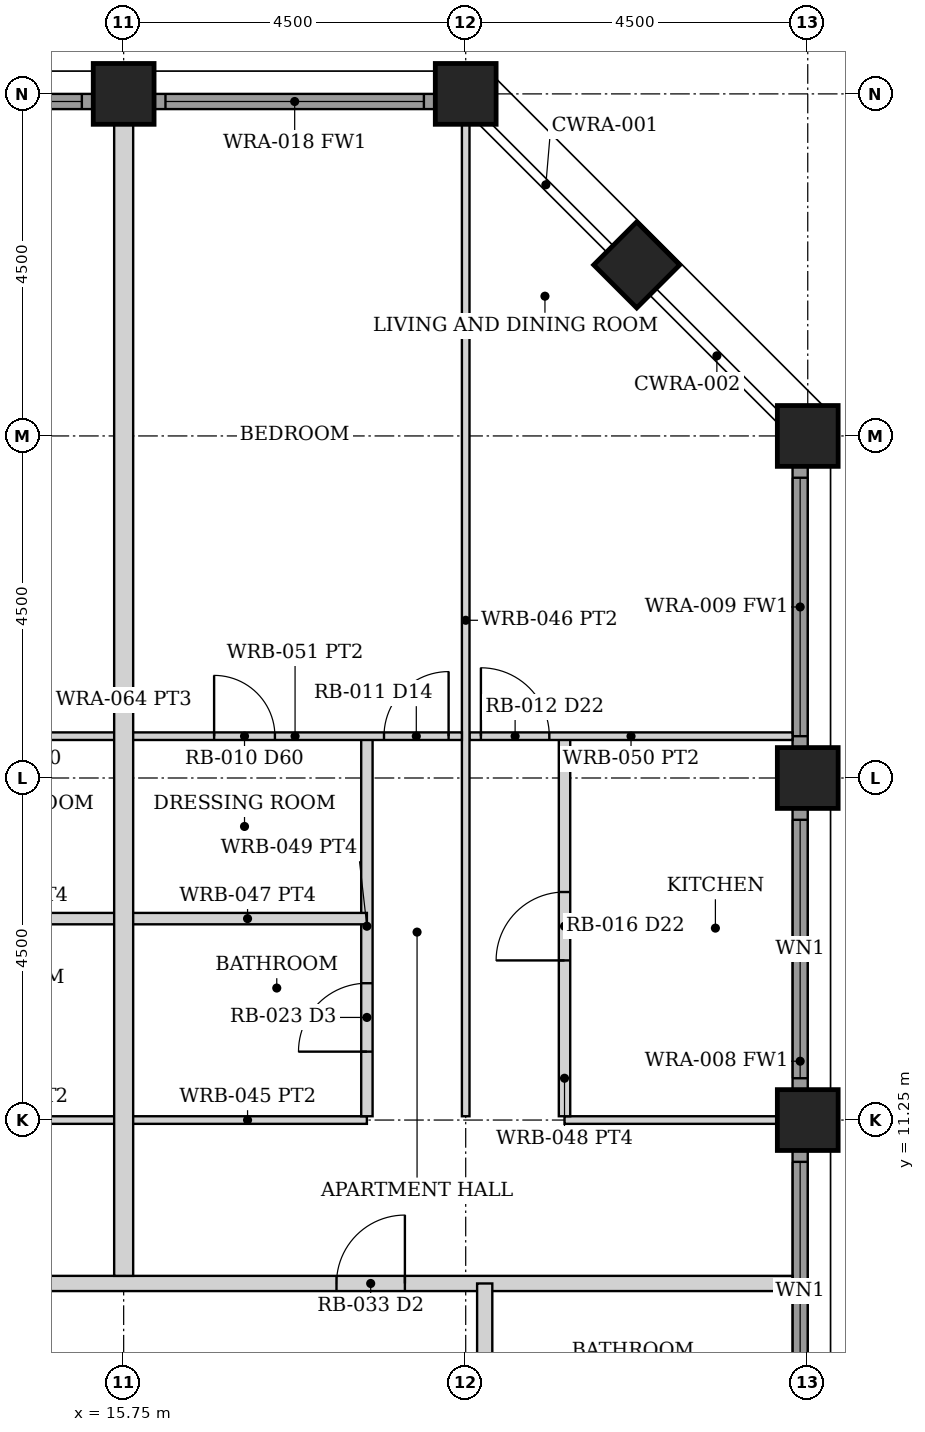
"""IFC4 building model, lengths in metres.
Left out: names, types, materials, properties, quantities, classifications, styles, units other than length and angle.
Written with IfcOpenShell. Run it as: python <this file> out.ifc"""

import sys

from ifc_helpers import new_model, si_unit, direction, frame, frame_2d, origin, origin_2d, place, context, subcontext, project, spatial, rectangle, hollow_rectangle, extrude, element, fill, save


model = new_model("IFC4")
c1 = context("Model", 3, precision=1e-05, world=origin(), true_north=direction((0.0, 1.0)))
c2 = subcontext(c1, "Body", "Model", "MODEL_VIEW")
j1 = project(units=[si_unit("LENGTHUNIT", "METRE"), si_unit("PLANEANGLEUNIT", "RADIAN")], contexts=[c1])
p1 = place(None, origin())
s1 = spatial("IfcSite", under=j1, at=p1, CompositionType="ELEMENT")
p2 = place(p1, origin())
s2 = spatial("IfcBuilding", under=s1, at=p2, CompositionType="ELEMENT")
p3 = place(p2, frame((0.0, 0.0, 37.0)))
s3 = spatial("IfcBuildingStorey", under=s2, at=p3, CompositionType="ELEMENT", Elevation=37.0)
for number, where, z_axis, x_axis in (
    (1, (24.75, 11.25, 0.0), (0.0, 0.0, 1.0), (1.0, 0.0, 0.0)),
    (2, (15.75, 24.75, 0.0), (0.0, 0.0, 1.0), (0.0, 1.0, 0.0)),
    (3, (24.75, 15.75, 0.0), (0.0, 0.0, 1.0), (1.0, 0.0, 0.0)),
    (4, (20.25, 24.75, 0.0), (0.0, 0.0, 1.0), (0.0, 1.0, 0.0)),
    (5, (24.75, 20.25, 0.0), (0.0, 0.0, 1.0), (1.0, 0.0, 0.0)),
    (6, (22.5, 22.5, 0.0), (0.0, 0.0, 1.0), (0.707, 0.707, 0.0)),
):
    element("IfcColumn", number, at=place(p3, frame(where, z_axis=z_axis, x_axis=x_axis)), inside=s3, PredefinedType="COLUMN", context=c2, shape_type="SweptSolid", body=[
        extrude(hollow_rectangle(XDim=0.8, YDim=0.8, WallThickness=0.07, at=origin_2d()), origin(), (0.0, 0.0, 1.0), 3.5),
    ])
p4 = place(p3, frame((24.65, 7.155, 0.0), z_axis=(0.0, 0.0, 1.0), x_axis=(0.0, 1.0, 0.0)))
e7 = element("IfcWall", 7, at=p4, inside=s3, PredefinedType="SOLIDWALL", context=c2, shape_type="SweptSolid", body=[
    extrude(rectangle(XDim=3.69, YDim=0.2, at=frame_2d((1.845, 0.0))), origin(), (0.0, 0.0, 1.0), 2.379),
])
p5 = place(p4, frame((0.145, 0.0, 0.3)))
e8 = element("IfcOpeningElement", 8, at=p5, cuts=e7, PredefinedType="OPENING", context=c2, shape_type="SweptSolid", body=[
    extrude(rectangle(XDim=3.4, YDim=1.929, at=frame_2d((1.7, 0.964))), frame((0.0, 0.11, 0.0), z_axis=(0.0, -1.0, 0.0), x_axis=(1.0, 0.0, 0.0)), (0.0, 0.0, 1.0), 0.22),
])
p6 = place(p3, frame((24.65, 11.655, 0.0), z_axis=(0.0, 0.0, 1.0), x_axis=(0.0, 1.0, 0.0)))
e9 = element("IfcWall", 9, at=p6, inside=s3, PredefinedType="SOLIDWALL", context=c2, shape_type="SweptSolid", body=[
    extrude(rectangle(XDim=3.69, YDim=0.2, at=frame_2d((1.845, 0.0))), origin(), (0.0, 0.0, 1.0), 2.379),
])
p7 = place(p6, frame((0.145, 0.0, 0.3)))
e10 = element("IfcOpeningElement", 10, at=p7, cuts=e9, PredefinedType="OPENING", context=c2, shape_type="SweptSolid", body=[
    extrude(rectangle(XDim=3.4, YDim=1.929, at=frame_2d((1.7, 0.964))), frame((0.0, 0.11, 0.0), z_axis=(0.0, -1.0, 0.0), x_axis=(1.0, 0.0, 0.0)), (0.0, 0.0, 1.0), 0.22),
])
p8 = place(p3, frame((24.65, 16.155, 0.0), z_axis=(0.0, 0.0, 1.0), x_axis=(0.0, 1.0, 0.0)))
e11 = element("IfcWall", 11, at=p8, inside=s3, PredefinedType="SOLIDWALL", context=c2, shape_type="SweptSolid", body=[
    extrude(rectangle(XDim=3.69, YDim=0.2, at=frame_2d((1.845, 0.0))), origin(), (0.0, 0.0, 1.0), 2.379),
])
p9 = place(p8, frame((0.145, 0.0, 0.3)))
e12 = element("IfcOpeningElement", 12, at=p9, cuts=e11, PredefinedType="OPENING", context=c2, shape_type="SweptSolid", body=[
    extrude(rectangle(XDim=3.4, YDim=1.929, at=frame_2d((1.7, 0.964))), frame((0.0, 0.11, 0.0), z_axis=(0.0, -1.0, 0.0), x_axis=(1.0, 0.0, 0.0)), (0.0, 0.0, 1.0), 0.22),
])
p10 = place(p3, frame((11.655, 24.65, 0.0), z_axis=(0.0, 0.0, 1.0), x_axis=(1.0, 0.0, 0.0)))
e13 = element("IfcWall", 13, at=p10, inside=s3, PredefinedType="SOLIDWALL", context=c2, shape_type="SweptSolid", body=[
    extrude(rectangle(XDim=3.69, YDim=0.2, at=frame_2d((1.845, 0.0))), origin(), (0.0, 0.0, 1.0), 2.379),
])
p11 = place(p10, frame((0.145, 0.0, 0.3)))
e14 = element("IfcOpeningElement", 14, at=p11, cuts=e13, PredefinedType="OPENING", context=c2, shape_type="SweptSolid", body=[
    extrude(rectangle(XDim=3.4, YDim=1.929, at=frame_2d((1.7, 0.964))), frame((0.0, 0.11, 0.0), z_axis=(0.0, -1.0, 0.0), x_axis=(1.0, 0.0, 0.0)), (0.0, 0.0, 1.0), 0.22),
])
p12 = place(p3, frame((16.155, 24.65, 0.0), z_axis=(0.0, 0.0, 1.0), x_axis=(1.0, 0.0, 0.0)))
e15 = element("IfcWall", 15, at=p12, inside=s3, PredefinedType="SOLIDWALL", context=c2, shape_type="SweptSolid", body=[
    extrude(rectangle(XDim=3.69, YDim=0.2, at=frame_2d((1.845, 0.0))), origin(), (0.0, 0.0, 1.0), 2.379),
])
p13 = place(p12, frame((0.145, 0.0, 0.3)))
e16 = element("IfcOpeningElement", 16, at=p13, cuts=e15, PredefinedType="OPENING", context=c2, shape_type="SweptSolid", body=[
    extrude(rectangle(XDim=3.4, YDim=1.929, at=frame_2d((1.7, 0.964))), frame((0.0, 0.11, 0.0), z_axis=(0.0, -1.0, 0.0), x_axis=(1.0, 0.0, 0.0)), (0.0, 0.0, 1.0), 0.22),
])
p14 = place(p3, frame((-24.55, 9.1, 0.0), z_axis=(0.0, 0.0, 1.0), x_axis=(1.0, 0.0, 0.0)))
e17 = element("IfcWall", 17, at=p14, inside=s3, PredefinedType="PARTITIONING", context=c2, shape_type="SweptSolid", body=[
    extrude(rectangle(XDim=49.1, YDim=0.2, at=frame_2d((24.55, 0.0))), origin(), (0.0, 0.0, 1.0), 2.373),
])
p15 = place(p14, frame((5.1, 0.0, 0.0)))
e18 = element("IfcOpeningElement", 18, at=p15, cuts=e17, PredefinedType="OPENING", context=c2, shape_type="SweptSolid", body=[
    extrude(rectangle(XDim=0.9, YDim=2.1, at=frame_2d((0.45, 1.05))), frame((0.0, 0.11, 0.0), z_axis=(0.0, -1.0, 0.0), x_axis=(1.0, 0.0, 0.0)), (0.0, 0.0, 1.0), 0.22),
])
p16 = place(p14, frame((13.6, 0.0, 0.0)))
e19 = element("IfcOpeningElement", 19, at=p16, cuts=e17, PredefinedType="OPENING", context=c2, shape_type="SweptSolid", body=[
    extrude(rectangle(XDim=0.9, YDim=2.1, at=frame_2d((0.45, 1.05))), frame((0.0, 0.11, 0.0), z_axis=(0.0, -1.0, 0.0), x_axis=(1.0, 0.0, 0.0)), (0.0, 0.0, 1.0), 0.22),
])
p17 = place(p14, frame((18.0, 0.0, 0.0)))
e20 = element("IfcOpeningElement", 20, at=p17, cuts=e17, PredefinedType="OPENING", context=c2, shape_type="SweptSolid", body=[
    extrude(rectangle(XDim=0.9, YDim=2.1, at=frame_2d((0.45, 1.05))), frame((0.0, 0.11, 0.0), z_axis=(0.0, -1.0, 0.0), x_axis=(1.0, 0.0, 0.0)), (0.0, 0.0, 1.0), 0.22),
])
p18 = place(p14, frame((22.5, 0.0, 0.0)))
e21 = element("IfcOpeningElement", 21, at=p18, cuts=e17, PredefinedType="OPENING", context=c2, shape_type="SweptSolid", body=[
    extrude(rectangle(XDim=0.9, YDim=2.1, at=frame_2d((0.45, 1.05))), frame((0.0, 0.11, 0.0), z_axis=(0.0, -1.0, 0.0), x_axis=(1.0, 0.0, 0.0)), (0.0, 0.0, 1.0), 0.22),
])
p19 = place(p14, frame((27.0, 0.0, 0.0)))
e22 = element("IfcOpeningElement", 22, at=p19, cuts=e17, PredefinedType="OPENING", context=c2, shape_type="SweptSolid", body=[
    extrude(rectangle(XDim=0.9, YDim=2.1, at=frame_2d((0.45, 1.05))), frame((0.0, 0.11, 0.0), z_axis=(0.0, -1.0, 0.0), x_axis=(1.0, 0.0, 0.0)), (0.0, 0.0, 1.0), 0.22),
])
p20 = place(p14, frame((31.6, 0.0, 0.0)))
e23 = element("IfcOpeningElement", 23, at=p20, cuts=e17, PredefinedType="OPENING", context=c2, shape_type="SweptSolid", body=[
    extrude(rectangle(XDim=0.9, YDim=2.1, at=frame_2d((0.45, 1.05))), frame((0.0, 0.11, 0.0), z_axis=(0.0, -1.0, 0.0), x_axis=(1.0, 0.0, 0.0)), (0.0, 0.0, 1.0), 0.22),
])
p21 = place(p14, frame((43.1, 0.0, 0.0)))
e24 = element("IfcOpeningElement", 24, at=p21, cuts=e17, PredefinedType="OPENING", context=c2, shape_type="SweptSolid", body=[
    extrude(rectangle(XDim=0.9, YDim=2.1, at=frame_2d((0.45, 1.05))), frame((0.0, 0.11, 0.0), z_axis=(0.0, -1.0, 0.0), x_axis=(1.0, 0.0, 0.0)), (0.0, 0.0, 1.0), 0.22),
])
p22 = place(p3, frame((20.5, -9.1, 0.0), z_axis=(0.0, 0.0, 1.0), x_axis=(0.0, 1.0, 0.0)))
e25 = element("IfcWall", 25, at=p22, inside=s3, PredefinedType="PARTITIONING", context=c2, shape_type="SweptSolid", body=[
    extrude(rectangle(XDim=18.2, YDim=0.2, at=frame_2d((9.1, 0.0))), origin(), (0.0, 0.0, 1.0), 2.373),
])
p23 = place(p22, frame((6.4, 0.0, 0.0)))
e26 = element("IfcOpeningElement", 26, at=p23, cuts=e25, PredefinedType="OPENING", context=c2, shape_type="SweptSolid", body=[
    extrude(rectangle(XDim=0.9, YDim=2.1, at=frame_2d((0.45, 1.05))), frame((0.0, 0.11, 0.0), z_axis=(0.0, -1.0, 0.0), x_axis=(1.0, 0.0, 0.0)), (0.0, 0.0, 1.0), 0.22),
])
p24 = place(p3, frame((12.55, 11.25, 0.0), z_axis=(0.0, 0.0, 1.0), x_axis=(1.0, 0.0, 0.0)))
e27 = element("IfcWall", 27, at=p24, inside=s3, PredefinedType="PARTITIONING", context=c2, shape_type="SweptSolid", body=[
    extrude(rectangle(XDim=3.14, YDim=0.1, at=frame_2d((1.57, 0.0))), origin(), (0.0, 0.0, 1.0), 2.373),
])
p25 = place(p3, frame((11.3, 16.3, 0.0), z_axis=(0.0, 0.0, 1.0), x_axis=(1.0, 0.0, 0.0)))
e28 = element("IfcWall", 28, at=p25, inside=s3, PredefinedType="PARTITIONING", context=c2, shape_type="SweptSolid", body=[
    extrude(rectangle(XDim=4.39, YDim=0.1, at=frame_2d((2.195, 0.0))), origin(), (0.0, 0.0, 1.0), 2.373),
])
p26 = place(p25, frame((0.175, 0.0, 0.0)))
e29 = element("IfcOpeningElement", 29, at=p26, cuts=e28, PredefinedType="OPENING", context=c2, shape_type="SweptSolid", body=[
    extrude(rectangle(XDim=0.85, YDim=2.1, at=frame_2d((0.425, 1.05))), frame((0.0, 0.06, 0.0), z_axis=(0.0, -1.0, 0.0), x_axis=(1.0, 0.0, 0.0)), (0.0, 0.0, 1.0), 0.12),
])
p27 = place(p25, frame((2.46, 0.0, 0.0)))
e30 = element("IfcOpeningElement", 30, at=p27, cuts=e28, PredefinedType="OPENING", context=c2, shape_type="SweptSolid", body=[
    extrude(rectangle(XDim=0.8, YDim=2.1, at=frame_2d((0.4, 1.05))), frame((0.0, 0.06, 0.0), z_axis=(0.0, -1.0, 0.0), x_axis=(1.0, 0.0, 0.0)), (0.0, 0.0, 1.0), 0.12),
])
p28 = place(p3, frame((12.55, 13.9, 0.0), z_axis=(0.0, 0.0, 1.0), x_axis=(1.0, 0.0, 0.0)))
e31 = element("IfcWall", 31, at=p28, inside=s3, PredefinedType="PARTITIONING", context=c2, shape_type="SweptSolid", body=[
    extrude(rectangle(XDim=3.14, YDim=0.15, at=frame_2d((1.57, 0.0))), origin(), (0.0, 0.0, 1.0), 2.373),
])
p29 = place(p3, frame((21.55, 11.25, 0.0), z_axis=(0.0, 0.0, 1.0), x_axis=(1.0, 0.0, 0.0)))
e32 = element("IfcWall", 32, at=p29, inside=s3, PredefinedType="PARTITIONING", context=c2, shape_type="SweptSolid", body=[
    extrude(rectangle(XDim=2.8, YDim=0.1, at=frame_2d((1.4, 0.0))), origin(), (0.0, 0.0, 1.0), 2.373),
])
p30 = place(p3, frame((21.55, 11.3, 0.0), z_axis=(0.0, 0.0, 1.0), x_axis=(0.0, 1.0, 0.0)))
e33 = element("IfcWall", 33, at=p30, inside=s3, PredefinedType="PARTITIONING", context=c2, shape_type="SweptSolid", body=[
    extrude(rectangle(XDim=5.0, YDim=0.15, at=frame_2d((2.5, 0.0))), origin(), (0.0, 0.0, 1.0), 2.373),
])
p31 = place(p30, frame((2.05, 0.0, 0.0)))
e34 = element("IfcOpeningElement", 34, at=p31, cuts=e33, PredefinedType="OPENING", context=c2, shape_type="SweptSolid", body=[
    extrude(rectangle(XDim=0.9, YDim=2.1, at=frame_2d((0.45, 1.05))), frame((0.0, 0.085, 0.0), z_axis=(0.0, -1.0, 0.0), x_axis=(1.0, 0.0, 0.0)), (0.0, 0.0, 1.0), 0.17),
])
p32 = place(p3, frame((20.3, 16.3, 0.0), z_axis=(0.0, 0.0, 1.0), x_axis=(1.0, 0.0, 0.0)))
e35 = element("IfcWall", 35, at=p32, inside=s3, PredefinedType="PARTITIONING", context=c2, shape_type="SweptSolid", body=[
    extrude(rectangle(XDim=4.25, YDim=0.1, at=frame_2d((2.125, 0.0))), origin(), (0.0, 0.0, 1.0), 2.373),
])
p33 = place(p32, frame((0.15, 0.0, 0.0)))
e36 = element("IfcOpeningElement", 36, at=p33, cuts=e35, PredefinedType="OPENING", context=c2, shape_type="SweptSolid", body=[
    extrude(rectangle(XDim=0.9, YDim=2.1, at=frame_2d((0.45, 1.05))), frame((0.0, 0.06, 0.0), z_axis=(0.0, -1.0, 0.0), x_axis=(1.0, 0.0, 0.0)), (0.0, 0.0, 1.0), 0.12),
])
p34 = place(p3, frame((20.25, 11.3, 0.0), z_axis=(0.0, 0.0, 1.0), x_axis=(0.0, 1.0, 0.0)))
e37 = element("IfcWall", 37, at=p34, inside=s3, PredefinedType="PARTITIONING", context=c2, shape_type="SweptSolid", body=[
    extrude(rectangle(XDim=13.05, YDim=0.1, at=frame_2d((6.525, 0.0))), origin(), (0.0, 0.0, 1.0), 2.373),
])
p35 = place(p3, frame((15.81, 11.25, 0.0), z_axis=(0.0, 0.0, 1.0), x_axis=(1.0, 0.0, 0.0)))
e38 = element("IfcWall", 38, at=p35, inside=s3, PredefinedType="PARTITIONING", context=c2, shape_type="SweptSolid", body=[
    extrude(rectangle(XDim=3.14, YDim=0.1, at=frame_2d((1.57, 0.0))), origin(), (0.0, 0.0, 1.0), 2.373),
])
p36 = place(p3, frame((18.95, 11.3, 0.0), z_axis=(0.0, 0.0, 1.0), x_axis=(0.0, 1.0, 0.0)))
e39 = element("IfcWall", 39, at=p36, inside=s3, PredefinedType="PARTITIONING", context=c2, shape_type="SweptSolid", body=[
    extrude(rectangle(XDim=5.0, YDim=0.15, at=frame_2d((2.5, 0.0))), origin(), (0.0, 0.0, 1.0), 2.373),
])
p37 = place(p36, frame((0.85, 0.0, 0.0)))
e40 = element("IfcOpeningElement", 40, at=p37, cuts=e39, PredefinedType="OPENING", context=c2, shape_type="SweptSolid", body=[
    extrude(rectangle(XDim=0.9, YDim=2.1, at=frame_2d((0.45, 1.05))), frame((0.0, 0.085, 0.0), z_axis=(0.0, -1.0, 0.0), x_axis=(1.0, 0.0, 0.0)), (0.0, 0.0, 1.0), 0.17),
])
p38 = place(p3, frame((15.81, 16.3, 0.0), z_axis=(0.0, 0.0, 1.0), x_axis=(1.0, 0.0, 0.0)))
e41 = element("IfcWall", 41, at=p38, inside=s3, PredefinedType="PARTITIONING", context=c2, shape_type="SweptSolid", body=[
    extrude(rectangle(XDim=4.39, YDim=0.1, at=frame_2d((2.195, 0.0))), origin(), (0.0, 0.0, 1.0), 2.373),
])
p39 = place(p38, frame((3.365, 0.0, 0.0)))
e42 = element("IfcOpeningElement", 42, at=p39, cuts=e41, PredefinedType="OPENING", context=c2, shape_type="SweptSolid", body=[
    extrude(rectangle(XDim=0.85, YDim=2.1, at=frame_2d((0.425, 1.05))), frame((0.0, 0.06, 0.0), z_axis=(0.0, -1.0, 0.0), x_axis=(1.0, 0.0, 0.0)), (0.0, 0.0, 1.0), 0.12),
])
p40 = place(p38, frame((1.13, 0.0, 0.0)))
e43 = element("IfcOpeningElement", 43, at=p40, cuts=e41, PredefinedType="OPENING", context=c2, shape_type="SweptSolid", body=[
    extrude(rectangle(XDim=0.8, YDim=2.1, at=frame_2d((0.4, 1.05))), frame((0.0, 0.06, 0.0), z_axis=(0.0, -1.0, 0.0), x_axis=(1.0, 0.0, 0.0)), (0.0, 0.0, 1.0), 0.12),
])
p41 = place(p3, frame((15.81, 13.9, 0.0), z_axis=(0.0, 0.0, 1.0), x_axis=(1.0, 0.0, 0.0)))
e44 = element("IfcWall", 44, at=p41, inside=s3, PredefinedType="PARTITIONING", context=c2, shape_type="SweptSolid", body=[
    extrude(rectangle(XDim=3.14, YDim=0.15, at=frame_2d((1.57, 0.0))), origin(), (0.0, 0.0, 1.0), 2.373),
])
p42 = place(p3, frame((15.75, 9.2, 0.0), z_axis=(0.0, 0.0, 1.0), x_axis=(0.0, 1.0, 0.0)))
e45 = element("IfcWall", 45, at=p42, inside=s3, PredefinedType="PARTITIONING", context=c2, shape_type="SweptSolid", body=[
    extrude(rectangle(XDim=15.15, YDim=0.25, at=frame_2d((7.575, 0.0))), origin(), (0.0, 0.0, 1.0), 2.373),
])
p43 = place(p5, origin())
e46 = element("IfcWindow", 46, at=p43, inside=s3, PartitioningType="SINGLE_PANEL", PredefinedType="WINDOW", context=c2, shape_type="SweptSolid", body=[
    extrude(rectangle(XDim=3.4, YDim=1.929, at=frame_2d((1.7, 0.964))), frame((0.0, 0.03, 0.0), z_axis=(0.0, -1.0, 0.0), x_axis=(1.0, 0.0, 0.0)), (0.0, 0.0, 1.0), 0.06),
])
fill(e8, e46)
p44 = place(p7, origin())
e47 = element("IfcWindow", 47, at=p44, inside=s3, PartitioningType="SINGLE_PANEL", PredefinedType="WINDOW", context=c2, shape_type="SweptSolid", body=[
    extrude(rectangle(XDim=3.4, YDim=1.929, at=frame_2d((1.7, 0.964))), frame((0.0, 0.03, 0.0), z_axis=(0.0, -1.0, 0.0), x_axis=(1.0, 0.0, 0.0)), (0.0, 0.0, 1.0), 0.06),
])
fill(e10, e47)
p45 = place(p9, origin())
e48 = element("IfcWindow", 48, at=p45, inside=s3, PartitioningType="SINGLE_PANEL", PredefinedType="WINDOW", context=c2, shape_type="SweptSolid", body=[
    extrude(rectangle(XDim=3.4, YDim=1.929, at=frame_2d((1.7, 0.964))), frame((0.0, 0.03, 0.0), z_axis=(0.0, -1.0, 0.0), x_axis=(1.0, 0.0, 0.0)), (0.0, 0.0, 1.0), 0.06),
])
fill(e12, e48)
p46 = place(p11, origin())
e49 = element("IfcWindow", 49, at=p46, inside=s3, PartitioningType="SINGLE_PANEL", PredefinedType="WINDOW", context=c2, shape_type="SweptSolid", body=[
    extrude(rectangle(XDim=3.4, YDim=1.929, at=frame_2d((1.7, 0.964))), frame((0.0, 0.03, 0.0), z_axis=(0.0, -1.0, 0.0), x_axis=(1.0, 0.0, 0.0)), (0.0, 0.0, 1.0), 0.06),
])
fill(e14, e49)
p47 = place(p13, origin())
e50 = element("IfcWindow", 50, at=p47, inside=s3, PartitioningType="SINGLE_PANEL", PredefinedType="WINDOW", context=c2, shape_type="SweptSolid", body=[
    extrude(rectangle(XDim=3.4, YDim=1.929, at=frame_2d((1.7, 0.964))), frame((0.0, 0.03, 0.0), z_axis=(0.0, -1.0, 0.0), x_axis=(1.0, 0.0, 0.0)), (0.0, 0.0, 1.0), 0.06),
])
fill(e16, e50)
p48 = place(p21, origin())
e51 = element("IfcDoor", 51, at=p48, inside=s3, OperationType="SINGLE_SWING_RIGHT", PredefinedType="DOOR", context=c2, shape_type="SweptSolid", body=[
    extrude(rectangle(XDim=0.9, YDim=2.1, at=frame_2d((0.45, 1.05))), frame((0.0, 0.025, 0.0), z_axis=(0.0, -1.0, 0.0), x_axis=(1.0, 0.0, 0.0)), (0.0, 0.0, 1.0), 0.05),
])
fill(e24, e51)
p49 = place(p31, origin())
e52 = element("IfcDoor", 52, at=p49, inside=s3, OperationType="SINGLE_SWING_LEFT", PredefinedType="DOOR", context=c2, shape_type="SweptSolid", body=[
    extrude(rectangle(XDim=0.9, YDim=2.1, at=frame_2d((0.45, 1.05))), frame((0.0, 0.025, 0.0), z_axis=(0.0, -1.0, 0.0), x_axis=(1.0, 0.0, 0.0)), (0.0, 0.0, 1.0), 0.05),
])
fill(e34, e52)
p50 = place(p33, origin())
e53 = element("IfcDoor", 53, at=p50, inside=s3, OperationType="SINGLE_SWING_LEFT", PredefinedType="DOOR", context=c2, shape_type="SweptSolid", body=[
    extrude(rectangle(XDim=0.9, YDim=2.1, at=frame_2d((0.45, 1.05))), frame((0.0, 0.025, 0.0), z_axis=(0.0, -1.0, 0.0), x_axis=(1.0, 0.0, 0.0)), (0.0, 0.0, 1.0), 0.05),
])
fill(e36, e53)
p51 = place(p39, origin())
e54 = element("IfcDoor", 54, at=p51, inside=s3, OperationType="SINGLE_SWING_RIGHT", PredefinedType="DOOR", context=c2, shape_type="SweptSolid", body=[
    extrude(rectangle(XDim=0.85, YDim=2.1, at=frame_2d((0.425, 1.05))), frame((0.0, 0.025, 0.0), z_axis=(0.0, -1.0, 0.0), x_axis=(1.0, 0.0, 0.0)), (0.0, 0.0, 1.0), 0.05),
])
fill(e42, e54)
p52 = place(p37, origin())
e55 = element("IfcDoor", 55, at=p52, inside=s3, OperationType="SINGLE_SWING_LEFT", PredefinedType="DOOR", context=c2, shape_type="SweptSolid", body=[
    extrude(rectangle(XDim=0.9, YDim=2.1, at=frame_2d((0.45, 1.05))), frame((0.0, 0.025, 0.0), z_axis=(0.0, -1.0, 0.0), x_axis=(1.0, 0.0, 0.0)), (0.0, 0.0, 1.0), 0.05),
])
fill(e40, e55)
p53 = place(p40, origin())
e56 = element("IfcDoor", 56, at=p53, inside=s3, OperationType="SINGLE_SWING_LEFT", PredefinedType="DOOR", context=c2, shape_type="SweptSolid", body=[
    extrude(rectangle(XDim=0.8, YDim=2.1, at=frame_2d((0.4, 1.05))), frame((0.0, 0.025, 0.0), z_axis=(0.0, -1.0, 0.0), x_axis=(1.0, 0.0, 0.0)), (0.0, 0.0, 1.0), 0.05),
])
fill(e43, e56)
save(model, sys.argv[1])
